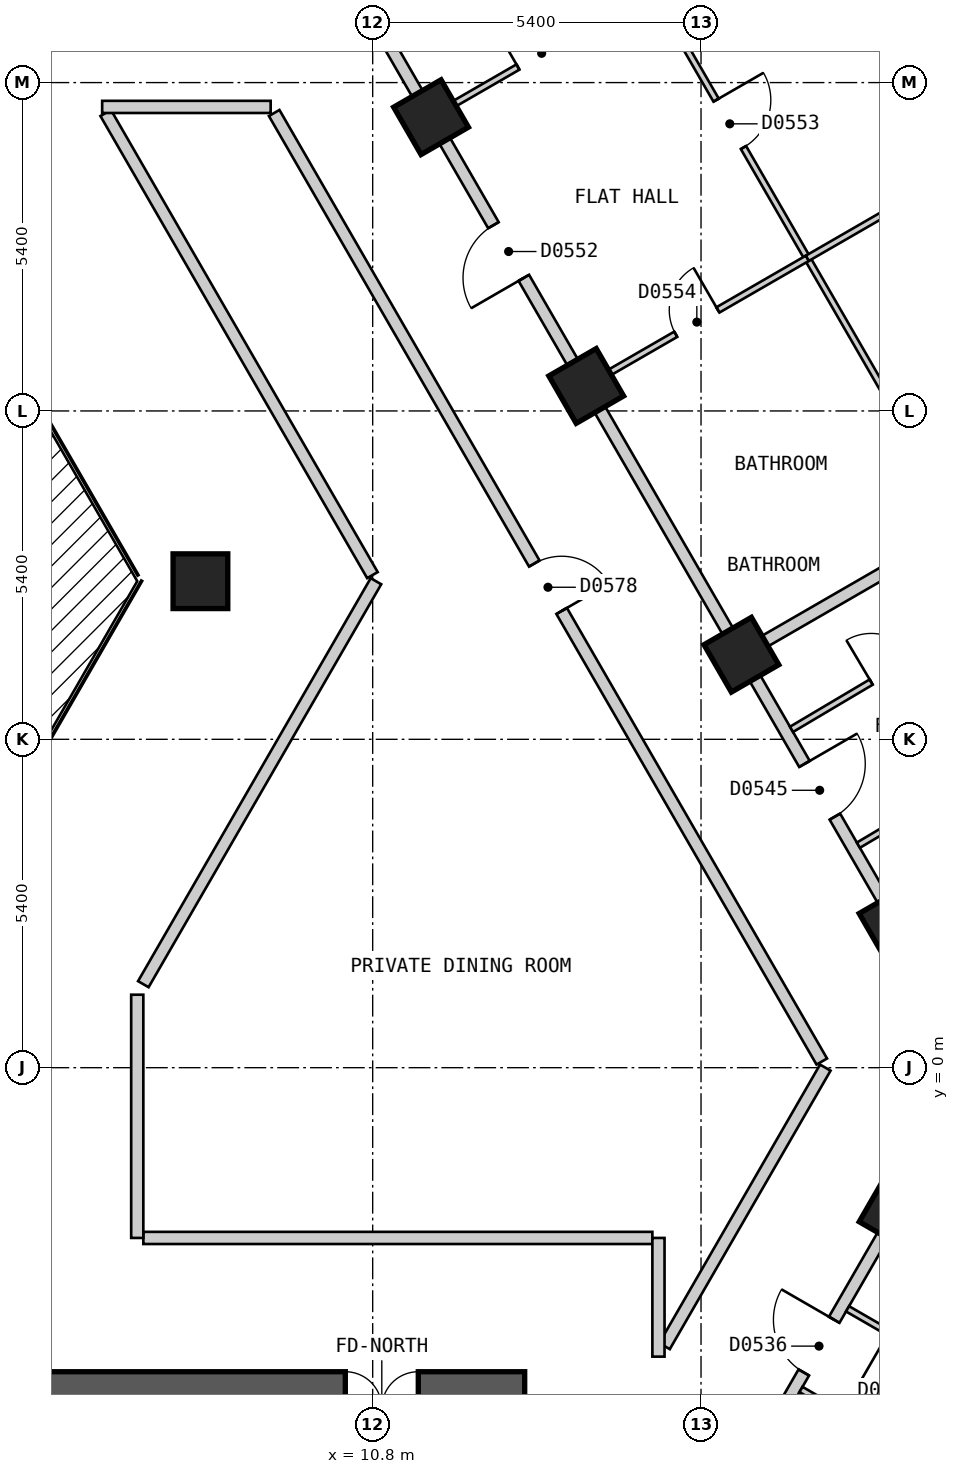
"""IFC4 building model, lengths in metres.
Left out: names, types, materials, properties, quantities, classifications, styles, units other than length and angle.
Written with IfcOpenShell. Run it as: python <this file> out.ifc"""

import sys

from ifc_helpers import new_model, si_unit, direction, frame, frame_2d, origin, origin_2d, place, context, subcontext, project, spatial, polyline, rectangle, outline, extrude, element, fill, save


model = new_model("IFC4")
c1 = context("Model", 3, precision=1e-05, world=origin(), true_north=direction((0.0, 1.0)))
c2 = subcontext(c1, "Body", "Model", "MODEL_VIEW")
j1 = project(units=[si_unit("LENGTHUNIT", "METRE"), si_unit("PLANEANGLEUNIT", "RADIAN")], contexts=[c1])
p1 = place(None, origin())
s1 = spatial("IfcSite", under=j1, at=p1, CompositionType="ELEMENT")
p2 = place(p1, origin())
s2 = spatial("IfcBuilding", under=s1, at=p2, CompositionType="ELEMENT")
p3 = place(p2, frame((0.0, 0.0, 50.4)))
s3 = spatial("IfcBuildingStorey", under=s2, at=p3, CompositionType="ELEMENT", Elevation=50.4)
for number, where, z_axis, x_axis in (
    (1, (19.417, -2.369, 0.0), (0.0, 0.0, 1.0), (0.5, 0.866, 0.0)),
    (2, (19.416, 2.371, 0.0), (0.0, 0.0, 1.0), (-0.5, 0.866, 0.0)),
    (3, (16.864, 6.791, 0.0), (0.0, 0.0, 1.0), (-0.5, 0.866, 0.0)),
    (4, (14.312, 11.211, 0.0), (0.0, 0.0, 1.0), (-0.5, 0.866, 0.0)),
    (5, (7.967, 8.0, 0.0), (0.0, 0.0, 1.0), (1.0, 0.0, 0.0)),
    (6, (11.76, 15.631, 0.0), (0.0, 0.0, 1.0), (-0.5, 0.866, 0.0)),
):
    element("IfcColumn", number, at=place(p3, frame(where, z_axis=z_axis, x_axis=x_axis)), inside=s3, PredefinedType="COLUMN", context=c2, shape_type="SweptSolid", body=[
        extrude(rectangle(XDim=0.9, YDim=0.9, at=origin_2d()), origin(), (0.0, 0.0, 1.0), 3.0),
    ])
p4 = place(p3, frame((-13.3, -5.6, 0.0), z_axis=(0.0, 0.0, 1.0), x_axis=(1.0, 0.0, 0.0)))
e7 = element("IfcWall", 7, at=p4, inside=s3, PredefinedType="SHEAR", context=c2, shape_type="SweptSolid", body=[
    extrude(rectangle(XDim=26.6, YDim=1.2, at=frame_2d((13.3, 0.0))), origin(), (0.0, 0.0, 1.0), 2.7),
])
p5 = place(p4, frame((23.65, 0.0, 0.0)))
e8 = element("IfcOpeningElement", 8, at=p5, cuts=e7, PredefinedType="OPENING", context=c2, shape_type="SweptSolid", body=[
    extrude(rectangle(XDim=1.2, YDim=2.1, at=frame_2d((0.6, 1.05))), frame((0.0, 0.61, 0.0), z_axis=(0.0, -1.0, 0.0), x_axis=(1.0, 0.0, 0.0)), (0.0, 0.0, 1.0), 1.22),
])
p6 = place(p3, frame((17.71, -25.825, 0.0), z_axis=(0.0, 0.0, 1.0), x_axis=(0.500001938803, 0.866024284413, 0.0)))
e9 = element("IfcWall", 9, at=p6, inside=s3, PredefinedType="SOLIDWALL", context=c2, shape_type="SweptSolid", body=[
    extrude(outline(polyline([(0.0, -0.15), (27.02, -0.15), (26.94, 0.15), (0.08, 0.15), (0.0, -0.15)])), origin(), (0.0, 0.0, 1.0), 2.7),
])
p7 = place(p6, frame((2.553, 0.0, 0.15)))
e10 = element("IfcOpeningElement", 10, at=p7, cuts=e9, PredefinedType="OPENING", context=c2, shape_type="SweptSolid", body=[
    extrude(rectangle(XDim=1.5, YDim=2.1, at=frame_2d((0.75, 1.05))), frame((0.0, 0.16, 0.0), z_axis=(0.0, -1.0, 0.0), x_axis=(1.0, 0.0, 0.0)), (0.0, 0.0, 1.0), 0.32),
])
p8 = place(p6, frame((7.658, 0.0, 0.15)))
e11 = element("IfcOpeningElement", 11, at=p8, cuts=e9, PredefinedType="OPENING", context=c2, shape_type="SweptSolid", body=[
    extrude(rectangle(XDim=1.5, YDim=2.1, at=frame_2d((0.75, 1.05))), frame((0.0, 0.16, 0.0), z_axis=(0.0, -1.0, 0.0), x_axis=(1.0, 0.0, 0.0)), (0.0, 0.0, 1.0), 0.32),
])
p9 = place(p6, frame((12.761, 0.0, 0.15)))
e12 = element("IfcOpeningElement", 12, at=p9, cuts=e9, PredefinedType="OPENING", context=c2, shape_type="SweptSolid", body=[
    extrude(rectangle(XDim=1.5, YDim=2.1, at=frame_2d((0.75, 1.05))), frame((0.0, 0.16, 0.0), z_axis=(0.0, -1.0, 0.0), x_axis=(1.0, 0.0, 0.0)), (0.0, 0.0, 1.0), 0.32),
])
p10 = place(p6, frame((17.865, 0.0, 0.15)))
e13 = element("IfcOpeningElement", 13, at=p10, cuts=e9, PredefinedType="OPENING", context=c2, shape_type="SweptSolid", body=[
    extrude(rectangle(XDim=1.5, YDim=2.1, at=frame_2d((0.75, 1.05))), frame((0.0, 0.16, 0.0), z_axis=(0.0, -1.0, 0.0), x_axis=(1.0, 0.0, 0.0)), (0.0, 0.0, 1.0), 0.32),
])
p11 = place(p6, frame((22.969, 0.0, 0.15)))
e14 = element("IfcOpeningElement", 14, at=p11, cuts=e9, PredefinedType="OPENING", context=c2, shape_type="SweptSolid", body=[
    extrude(rectangle(XDim=1.5, YDim=2.1, at=frame_2d((0.75, 1.05))), frame((0.0, 0.16, 0.0), z_axis=(0.0, -1.0, 0.0), x_axis=(1.0, 0.0, 0.0)), (0.0, 0.0, 1.0), 0.32),
])
p12 = place(p3, frame((31.22, 2.425, 0.0), z_axis=(0.0, 0.0, 1.0), x_axis=(-0.500001938803, 0.866024284413, 0.0)))
e15 = element("IfcWall", 15, at=p12, inside=s3, PredefinedType="SOLIDWALL", context=c2, shape_type="SweptSolid", body=[
    extrude(outline(polyline([(0.0, -0.15), (27.02, -0.15), (26.94, 0.15), (0.08, 0.15), (0.0, -0.15)])), origin(), (0.0, 0.0, 1.0), 2.7),
])
p13 = place(p12, frame((2.553, 0.0, 0.15)))
e16 = element("IfcOpeningElement", 16, at=p13, cuts=e15, PredefinedType="OPENING", context=c2, shape_type="SweptSolid", body=[
    extrude(rectangle(XDim=1.5, YDim=2.1, at=frame_2d((0.75, 1.05))), frame((0.0, 0.16, 0.0), z_axis=(0.0, -1.0, 0.0), x_axis=(1.0, 0.0, 0.0)), (0.0, 0.0, 1.0), 0.32),
])
p14 = place(p12, frame((7.657, 0.0, 0.15)))
e17 = element("IfcOpeningElement", 17, at=p14, cuts=e15, PredefinedType="OPENING", context=c2, shape_type="SweptSolid", body=[
    extrude(rectangle(XDim=1.5, YDim=2.1, at=frame_2d((0.75, 1.05))), frame((0.0, 0.16, 0.0), z_axis=(0.0, -1.0, 0.0), x_axis=(1.0, 0.0, 0.0)), (0.0, 0.0, 1.0), 0.32),
])
p15 = place(p12, frame((12.761, 0.0, 0.15)))
e18 = element("IfcOpeningElement", 18, at=p15, cuts=e15, PredefinedType="OPENING", context=c2, shape_type="SweptSolid", body=[
    extrude(rectangle(XDim=1.5, YDim=2.1, at=frame_2d((0.75, 1.05))), frame((0.0, 0.16, 0.0), z_axis=(0.0, -1.0, 0.0), x_axis=(1.0, 0.0, 0.0)), (0.0, 0.0, 1.0), 0.32),
])
p16 = place(p12, frame((17.865, 0.0, 0.15)))
e19 = element("IfcOpeningElement", 19, at=p16, cuts=e15, PredefinedType="OPENING", context=c2, shape_type="SweptSolid", body=[
    extrude(rectangle(XDim=1.5, YDim=2.1, at=frame_2d((0.75, 1.05))), frame((0.0, 0.16, 0.0), z_axis=(0.0, -1.0, 0.0), x_axis=(1.0, 0.0, 0.0)), (0.0, 0.0, 1.0), 0.32),
])
p17 = place(p12, frame((22.969, 0.0, 0.15)))
e20 = element("IfcOpeningElement", 20, at=p17, cuts=e15, PredefinedType="OPENING", context=c2, shape_type="SweptSolid", body=[
    extrude(rectangle(XDim=1.5, YDim=2.1, at=frame_2d((0.75, 1.05))), frame((0.0, 0.16, 0.0), z_axis=(0.0, -1.0, 0.0), x_axis=(1.0, 0.0, 0.0)), (0.0, 0.0, 1.0), 0.32),
])
p18 = place(p3, frame((6.409, 15.7, 0.0), z_axis=(0.0, 0.0, 1.0), x_axis=(0.499930377127, -0.866065596838, 0.0)))
e21 = element("IfcWall", 21, at=p18, inside=s3, PredefinedType="PARTITIONING", context=c2, shape_type="SweptSolid", body=[
    extrude(rectangle(XDim=8.775, YDim=0.2, at=frame_2d((4.388, 0.0))), origin(), (0.0, 0.0, 1.0), 2.7),
])
p19 = place(p3, frame((9.18, 15.7, 0.0), z_axis=(0.0, 0.0, 1.0), x_axis=(0.500003652032, -0.866023295272, 0.0)))
e22 = element("IfcWall", 22, at=p19, inside=s3, PredefinedType="PARTITIONING", context=c2, shape_type="SweptSolid", body=[
    extrude(rectangle(XDim=18.012, YDim=0.2, at=frame_2d((9.006, 0.0))), origin(), (0.0, 0.0, 1.0), 2.7),
])
p20 = place(p19, frame((8.556, 0.0, 0.0)))
e23 = element("IfcOpeningElement", 23, at=p20, cuts=e22, PredefinedType="OPENING", context=c2, shape_type="SweptSolid", body=[
    extrude(rectangle(XDim=0.9, YDim=2.1, at=frame_2d((0.45, 1.05))), frame((0.0, 0.11, 0.0), z_axis=(0.0, -1.0, 0.0), x_axis=(1.0, 0.0, 0.0)), (0.0, 0.0, 1.0), 0.22),
])
p21 = place(p3, frame((10.45, 17.9, 0.0), z_axis=(0.0, 0.0, 1.0), x_axis=(0.500034352617, -0.866005569383, 0.0)))
e24 = element("IfcWall", 24, at=p21, inside=s3, PredefinedType="PARTITIONING", context=c2, shape_type="SweptSolid", body=[
    extrude(rectangle(XDim=20.553, YDim=0.2, at=frame_2d((10.276, 0.0))), origin(), (0.0, 0.0, 1.0), 2.7),
])
p22 = place(p21, frame((14.902, 0.0, 0.0)))
e25 = element("IfcOpeningElement", 25, at=p22, cuts=e24, PredefinedType="OPENING", context=c2, shape_type="SweptSolid", body=[
    extrude(rectangle(XDim=1.0, YDim=2.1, at=frame_2d((0.5, 1.05))), frame((0.0, 0.11, 0.0), z_axis=(0.0, -1.0, 0.0), x_axis=(1.0, 0.0, 0.0)), (0.0, 0.0, 1.0), 0.22),
])
p23 = place(p21, frame((4.671, 0.0, 0.0)))
e26 = element("IfcOpeningElement", 26, at=p23, cuts=e24, PredefinedType="OPENING", context=c2, shape_type="SweptSolid", body=[
    extrude(rectangle(XDim=1.0, YDim=2.1, at=frame_2d((0.5, 1.05))), frame((0.0, 0.11, 0.0), z_axis=(0.0, -1.0, 0.0), x_axis=(1.0, 0.0, 0.0)), (0.0, 0.0, 1.0), 0.22),
])
p24 = place(p3, frame((7.028, -2.8, 0.0), z_axis=(0.0, 0.0, 1.0), x_axis=(1.0, 0.0, 0.0)))
e27 = element("IfcWall", 27, at=p24, inside=s3, PredefinedType="PARTITIONING", context=c2, shape_type="SweptSolid", body=[
    extrude(rectangle(XDim=8.372, YDim=0.2, at=frame_2d((4.186, 0.0))), origin(), (0.0, 0.0, 1.0), 2.7),
])
p25 = place(p3, frame((6.351, 15.8, 0.0), z_axis=(0.0, 0.0, 1.0), x_axis=(1.0, 0.0, 0.0)))
e28 = element("IfcWall", 28, at=p25, inside=s3, PredefinedType="PARTITIONING", context=c2, shape_type="SweptSolid", body=[
    extrude(rectangle(XDim=2.771, YDim=0.2, at=frame_2d((1.385, 0.0))), origin(), (0.0, 0.0, 1.0), 2.7),
])
p26 = place(p3, frame((7.028, 1.373, 0.0), z_axis=(0.0, 0.0, 1.0), x_axis=(0.49998574534, 0.86603363356, 0.0)))
e29 = element("IfcWall", 29, at=p26, inside=s3, PredefinedType="PARTITIONING", context=c2, shape_type="SweptSolid", body=[
    extrude(rectangle(XDim=7.652, YDim=0.2, at=frame_2d((3.826, 0.0))), origin(), (0.0, 0.0, 1.0), 2.7),
])
p27 = place(p3, frame((15.6, -4.579, 0.0), z_axis=(0.0, 0.0, 1.0), x_axis=(0.499927597274, 0.866067201483, 0.0)))
e30 = element("IfcWall", 30, at=p27, inside=s3, PredefinedType="PARTITIONING", context=c2, shape_type="SweptSolid", body=[
    extrude(rectangle(XDim=5.288, YDim=0.2, at=frame_2d((2.644, 0.0))), origin(), (0.0, 0.0, 1.0), 2.7),
])
p28 = place(p3, frame((15.707, -8.794, 0.0), z_axis=(0.0, 0.0, 1.0), x_axis=(0.50000451406, 0.866022797575, 0.0)))
e31 = element("IfcWall", 31, at=p28, inside=s3, PredefinedType="PARTITIONING", context=c2, shape_type="SweptSolid", body=[
    extrude(rectangle(XDim=10.04, YDim=0.2, at=frame_2d((5.02, 0.0))), origin(), (0.0, 0.0, 1.0), 2.7),
])
p29 = place(p28, frame((4.367, 0.0, 0.0)))
e32 = element("IfcOpeningElement", 32, at=p29, cuts=e31, PredefinedType="OPENING", context=c2, shape_type="SweptSolid", body=[
    extrude(rectangle(XDim=1.0, YDim=2.1, at=frame_2d((0.5, 1.05))), frame((0.0, 0.11, 0.0), z_axis=(0.0, -1.0, 0.0), x_axis=(1.0, 0.0, 0.0)), (0.0, 0.0, 1.0), 0.22),
])
p30 = place(p28, frame((8.402, 0.0, 0.0)))
e33 = element("IfcOpeningElement", 33, at=p30, cuts=e31, PredefinedType="OPENING", context=c2, shape_type="SweptSolid", body=[
    extrude(rectangle(XDim=0.8, YDim=2.1, at=frame_2d((0.4, 1.05))), frame((0.0, 0.11, 0.0), z_axis=(0.0, -1.0, 0.0), x_axis=(1.0, 0.0, 0.0)), (0.0, 0.0, 1.0), 0.22),
])
p31 = place(p3, frame((6.928, -2.8, 0.0), z_axis=(0.0, 0.0, 1.0), x_axis=(0.0, 1.0, 0.0)))
e34 = element("IfcWall", 34, at=p31, inside=s3, PredefinedType="PARTITIONING", context=c2, shape_type="SweptSolid", body=[
    extrude(rectangle(XDim=4.0, YDim=0.2, at=frame_2d((2.0, 0.0))), origin(), (0.0, 0.0, 1.0), 2.7),
])
p32 = place(p3, frame((15.5, -4.752, 0.0), z_axis=(0.0, 0.0, 1.0), x_axis=(0.0, 1.0, 0.0)))
e35 = element("IfcWall", 35, at=p32, inside=s3, PredefinedType="PARTITIONING", context=c2, shape_type="SweptSolid", body=[
    extrude(rectangle(XDim=1.952, YDim=0.2, at=frame_2d((0.976, 0.0))), origin(), (0.0, 0.0, 1.0), 2.7),
])
p33 = place(p3, frame((12.875, 22.1, 0.0), z_axis=(0.0, 0.0, 1.0), x_axis=(0.499994897061, -0.866028349948, 0.0)))
e36 = element("IfcWall", 36, at=p33, inside=s3, PredefinedType="PARTITIONING", context=c2, shape_type="SweptSolid", body=[
    extrude(rectangle(XDim=15.152, YDim=0.1, at=frame_2d((7.576, 0.0))), origin(), (0.0, 0.0, 1.0), 2.7),
])
p34 = place(p33, frame((7.146, 0.0, 0.0)))
e37 = element("IfcOpeningElement", 37, at=p34, cuts=e36, PredefinedType="OPENING", context=c2, shape_type="SweptSolid", body=[
    extrude(rectangle(XDim=0.9, YDim=2.1, at=frame_2d((0.45, 1.05))), frame((0.0, 0.06, 0.0), z_axis=(0.0, -1.0, 0.0), x_axis=(1.0, 0.0, 0.0)), (0.0, 0.0, 1.0), 0.12),
])
p35 = place(p3, frame((17.844, -5.292, 0.0), z_axis=(0.0, 0.0, 1.0), x_axis=(0.866038211682, -0.499977815414, 0.0)))
e38 = element("IfcWall", 38, at=p35, inside=s3, PredefinedType="PARTITIONING", context=c2, shape_type="SweptSolid", body=[
    extrude(rectangle(XDim=2.51, YDim=0.1, at=frame_2d((1.255, 0.0))), origin(), (0.0, 0.0, 1.0), 2.7),
])
p36 = place(p35, frame((0.83, 0.0, 0.0)))
e39 = element("IfcOpeningElement", 39, at=p36, cuts=e38, PredefinedType="OPENING", context=c2, shape_type="SweptSolid", body=[
    extrude(rectangle(XDim=0.8, YDim=2.1, at=frame_2d((0.4, 1.05))), frame((0.0, 0.06, 0.0), z_axis=(0.0, -1.0, 0.0), x_axis=(1.0, 0.0, 0.0)), (0.0, 0.0, 1.0), 0.12),
])
p37 = place(p3, frame((18.61, -3.966, 0.0), z_axis=(0.0, 0.0, 1.0), x_axis=(0.865958718457, -0.500115484592, 0.0)))
e40 = element("IfcWall", 40, at=p37, inside=s3, PredefinedType="PARTITIONING", context=c2, shape_type="SweptSolid", body=[
    extrude(rectangle(XDim=2.509, YDim=0.1, at=frame_2d((1.255, 0.0))), origin(), (0.0, 0.0, 1.0), 2.7),
])
p38 = place(p37, frame((0.78, 0.0, 0.0)))
e41 = element("IfcOpeningElement", 41, at=p38, cuts=e40, PredefinedType="OPENING", context=c2, shape_type="SweptSolid", body=[
    extrude(rectangle(XDim=0.9, YDim=2.1, at=frame_2d((0.45, 1.05))), frame((0.0, 0.06, 0.0), z_axis=(0.0, -1.0, 0.0), x_axis=(1.0, 0.0, 0.0)), (0.0, 0.0, 1.0), 0.12),
])
p39 = place(p3, frame((11.847, 15.681, 0.0), z_axis=(0.0, 0.0, 1.0), x_axis=(0.865980278416, 0.500078151287, 0.0)))
e42 = element("IfcWall", 42, at=p39, inside=s3, PredefinedType="PARTITIONING", context=c2, shape_type="SweptSolid", body=[
    extrude(rectangle(XDim=4.099, YDim=0.1, at=frame_2d((2.05, 0.0))), origin(), (0.0, 0.0, 1.0), 2.7),
])
p40 = place(p39, frame((1.55, 0.0, 0.0)))
e43 = element("IfcOpeningElement", 43, at=p40, cuts=e42, PredefinedType="OPENING", context=c2, shape_type="SweptSolid", body=[
    extrude(rectangle(XDim=0.9, YDim=2.1, at=frame_2d((0.45, 1.05))), frame((0.0, 0.06, 0.0), z_axis=(0.0, -1.0, 0.0), x_axis=(1.0, 0.0, 0.0)), (0.0, 0.0, 1.0), 0.12),
])
p41 = place(p3, frame((14.399, 11.261, 0.0), z_axis=(0.0, 0.0, 1.0), x_axis=(0.865980278416, 0.500078151287, 0.0)))
e44 = element("IfcWall", 44, at=p41, inside=s3, PredefinedType="PARTITIONING", context=c2, shape_type="SweptSolid", body=[
    extrude(rectangle(XDim=4.099, YDim=0.1, at=frame_2d((2.05, 0.0))), origin(), (0.0, 0.0, 1.0), 2.7),
])
p42 = place(p41, frame((1.6, 0.0, 0.0)))
e45 = element("IfcOpeningElement", 45, at=p42, cuts=e44, PredefinedType="OPENING", context=c2, shape_type="SweptSolid", body=[
    extrude(rectangle(XDim=0.8, YDim=2.1, at=frame_2d((0.4, 1.05))), frame((0.0, 0.06, 0.0), z_axis=(0.0, -1.0, 0.0), x_axis=(1.0, 0.0, 0.0)), (0.0, 0.0, 1.0), 0.12),
])
p43 = place(p3, frame((17.688, 5.564, 0.0), z_axis=(0.0, 0.0, 1.0), x_axis=(0.860107296662, 0.510113162179, 0.0)))
e46 = element("IfcWall", 46, at=p43, inside=s3, PredefinedType="PARTITIONING", context=c2, shape_type="SweptSolid", body=[
    extrude(rectangle(XDim=3.897, YDim=0.1, at=frame_2d((1.949, 0.0))), origin(), (0.0, 0.0, 1.0), 2.7),
])
p44 = place(p43, frame((1.524, 0.0, 0.0)))
e47 = element("IfcOpeningElement", 47, at=p44, cuts=e46, PredefinedType="OPENING", context=c2, shape_type="SweptSolid", body=[
    extrude(rectangle(XDim=0.8, YDim=2.1, at=frame_2d((0.4, 1.05))), frame((0.0, 0.06, 0.0), z_axis=(0.0, -1.0, 0.0), x_axis=(1.0, 0.0, 0.0)), (0.0, 0.0, 1.0), 0.12),
])
p45 = place(p3, frame((18.788, 3.659, 0.0), z_axis=(0.0, 0.0, 1.0), x_axis=(0.860090994311, 0.510140648749, 0.0)))
e48 = element("IfcWall", 48, at=p45, inside=s3, PredefinedType="PARTITIONING", context=c2, shape_type="SweptSolid", body=[
    extrude(rectangle(XDim=3.897, YDim=0.1, at=frame_2d((1.948, 0.0))), origin(), (0.0, 0.0, 1.0), 2.7),
])
p46 = place(p45, frame((1.474, 0.0, 0.0)))
e49 = element("IfcOpeningElement", 49, at=p46, cuts=e48, PredefinedType="OPENING", context=c2, shape_type="SweptSolid", body=[
    extrude(rectangle(XDim=0.9, YDim=2.1, at=frame_2d((0.45, 1.05))), frame((0.0, 0.06, 0.0), z_axis=(0.0, -1.0, 0.0), x_axis=(1.0, 0.0, 0.0)), (0.0, 0.0, 1.0), 0.12),
])
p47 = place(p3, frame((16.95, 6.841, 0.0), z_axis=(0.0, 0.0, 1.0), x_axis=(0.866031112038, 0.499990112884, 0.0)))
e50 = element("IfcWall", 50, at=p47, inside=s3, PredefinedType="PARTITIONING", context=c2, shape_type="SweptSolid", body=[
    extrude(rectangle(XDim=3.948, YDim=0.2, at=frame_2d((1.974, 0.0))), origin(), (0.0, 0.0, 1.0), 2.7),
])
p48 = place(p3, frame((17.949, 13.311, 0.0), z_axis=(0.0, 0.0, 1.0), x_axis=(0.866052608538, 0.499952877023, 0.0)))
e51 = element("IfcWall", 51, at=p48, inside=s3, PredefinedType="PARTITIONING", context=c2, shape_type="SweptSolid", body=[
    extrude(rectangle(XDim=5.9, YDim=0.1, at=frame_2d((2.95, 0.0))), origin(), (0.0, 0.0, 1.0), 2.7),
])
p49 = place(p48, frame((2.5, 0.0, 0.0)))
e52 = element("IfcOpeningElement", 52, at=p49, cuts=e51, PredefinedType="OPENING", context=c2, shape_type="SweptSolid", body=[
    extrude(rectangle(XDim=0.9, YDim=2.1, at=frame_2d((0.45, 1.05))), frame((0.0, 0.06, 0.0), z_axis=(0.0, -1.0, 0.0), x_axis=(1.0, 0.0, 0.0)), (0.0, 0.0, 1.0), 0.12),
])
p50 = place(p29, origin())
e53 = element("IfcDoor", 53, at=p50, inside=s3, OperationType="SINGLE_SWING_RIGHT", PredefinedType="DOOR", context=c2, shape_type="SweptSolid", body=[
    extrude(rectangle(XDim=1.0, YDim=2.1, at=frame_2d((0.5, 1.05))), frame((0.0, 0.025, 0.0), z_axis=(0.0, -1.0, 0.0), x_axis=(1.0, 0.0, 0.0)), (0.0, 0.0, 1.0), 0.05),
])
fill(e32, e53)
p51 = place(p22, origin())
e54 = element("IfcDoor", 54, at=p51, inside=s3, OperationType="SINGLE_SWING_LEFT", PredefinedType="DOOR", context=c2, shape_type="SweptSolid", body=[
    extrude(rectangle(XDim=1.0, YDim=2.1, at=frame_2d((0.5, 1.05))), frame((0.0, 0.025, 0.0), z_axis=(0.0, -1.0, 0.0), x_axis=(1.0, 0.0, 0.0)), (0.0, 0.0, 1.0), 0.05),
])
fill(e25, e54)
p52 = place(p44, origin())
e55 = element("IfcDoor", 55, at=p52, inside=s3, OperationType="SINGLE_SWING_LEFT", PredefinedType="DOOR", context=c2, shape_type="SweptSolid", body=[
    extrude(rectangle(XDim=0.8, YDim=2.1, at=frame_2d((0.4, 1.05))), frame((0.0, 0.025, 0.0), z_axis=(0.0, -1.0, 0.0), x_axis=(1.0, 0.0, 0.0)), (0.0, 0.0, 1.0), 0.05),
])
fill(e47, e55)
p53 = place(p23, origin())
e56 = element("IfcDoor", 56, at=p53, inside=s3, OperationType="SINGLE_SWING_RIGHT", PredefinedType="DOOR", context=c2, shape_type="SweptSolid", body=[
    extrude(rectangle(XDim=1.0, YDim=2.1, at=frame_2d((0.5, 1.05))), frame((0.0, 0.025, 0.0), z_axis=(0.0, -1.0, 0.0), x_axis=(1.0, 0.0, 0.0)), (0.0, 0.0, 1.0), 0.05),
])
fill(e26, e56)
p54 = place(p34, origin())
e57 = element("IfcDoor", 57, at=p54, inside=s3, OperationType="SINGLE_SWING_LEFT", PredefinedType="DOOR", context=c2, shape_type="SweptSolid", body=[
    extrude(rectangle(XDim=0.9, YDim=2.1, at=frame_2d((0.45, 1.05))), frame((0.0, 0.025, 0.0), z_axis=(0.0, -1.0, 0.0), x_axis=(1.0, 0.0, 0.0)), (0.0, 0.0, 1.0), 0.05),
])
fill(e37, e57)
p55 = place(p42, origin())
e58 = element("IfcDoor", 58, at=p55, inside=s3, OperationType="SINGLE_SWING_RIGHT", PredefinedType="DOOR", context=c2, shape_type="SweptSolid", body=[
    extrude(rectangle(XDim=0.8, YDim=2.1, at=frame_2d((0.4, 1.05))), frame((0.0, 0.025, 0.0), z_axis=(0.0, -1.0, 0.0), x_axis=(1.0, 0.0, 0.0)), (0.0, 0.0, 1.0), 0.05),
])
fill(e45, e58)
p56 = place(p40, origin())
e59 = element("IfcDoor", 59, at=p56, inside=s3, OperationType="SINGLE_SWING_LEFT", PredefinedType="DOOR", context=c2, shape_type="SweptSolid", body=[
    extrude(rectangle(XDim=0.9, YDim=2.1, at=frame_2d((0.45, 1.05))), frame((0.0, 0.025, 0.0), z_axis=(0.0, -1.0, 0.0), x_axis=(1.0, 0.0, 0.0)), (0.0, 0.0, 1.0), 0.05),
])
fill(e43, e59)
p57 = place(p20, origin())
e60 = element("IfcDoor", 60, at=p57, inside=s3, OperationType="SINGLE_SWING_RIGHT", PredefinedType="DOOR", context=c2, shape_type="SweptSolid", body=[
    extrude(rectangle(XDim=0.9, YDim=2.1, at=frame_2d((0.45, 1.05))), frame((0.0, 0.025, 0.0), z_axis=(0.0, -1.0, 0.0), x_axis=(1.0, 0.0, 0.0)), (0.0, 0.0, 1.0), 0.05),
])
fill(e23, e60)
save(model, sys.argv[1])
